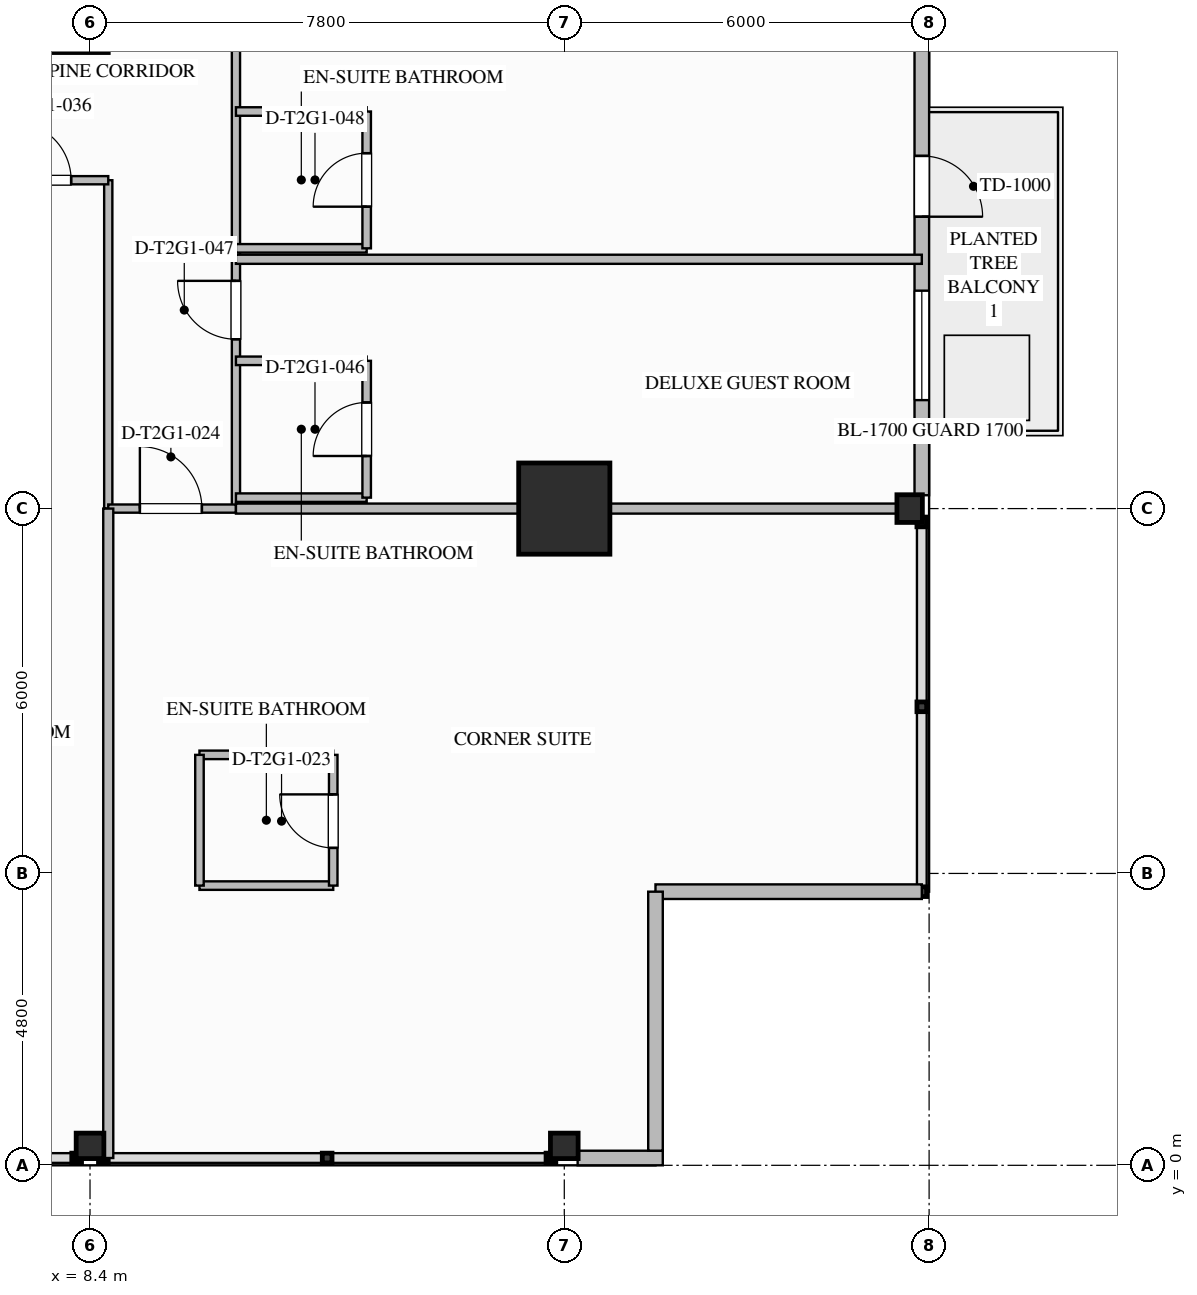
"""IFC4 building model, lengths in metres.
Left out: names, types, materials, properties, quantities, classifications, styles, units other than length and angle.
Written with IfcOpenShell. Run it as: python <this file> out.ifc"""

import sys

from ifc_helpers import new_model, si_unit, direction, frame, frame_2d, origin, origin_2d, place, context, subcontext, project, spatial, rectangle, i_section, extrude, element, fill, save


model = new_model("IFC4")
c1 = context("Model", 3, precision=1e-05, world=origin(), true_north=direction((0.0, 1.0)))
c2 = subcontext(c1, "Body", "Model", "MODEL_VIEW")
j1 = project(units=[si_unit("LENGTHUNIT", "METRE"), si_unit("PLANEANGLEUNIT", "RADIAN")], contexts=[c1])
p1 = place(None, origin())
s1 = spatial("IfcSite", under=j1, at=p1, CompositionType="ELEMENT")
p2 = place(p1, origin())
s2 = spatial("IfcBuilding", under=s1, at=p2, CompositionType="ELEMENT")
p3 = place(p2, frame((0.0, 0.0, 91.8)))
s3 = spatial("IfcBuildingStorey", under=s2, at=p3, CompositionType="ELEMENT", Elevation=91.8)
p4 = place(p3, frame((16.2, 10.8, 0.0), z_axis=(0.0, 0.0, 1.0), x_axis=(1.0, 0.0, 0.0)))
e1 = element("IfcColumn", 1, at=p4, inside=s3, PredefinedType="COLUMN", context=c2, shape_type="SweptSolid", body=[
    extrude(rectangle(XDim=1.5, YDim=1.5, at=origin_2d()), origin(), (0.0, 0.0, 1.0), 3.5),
])
for number, where, z_axis, x_axis in (
    (2, (21.88, 10.8, 0.0), (0.0, 0.0, 1.0), (1.0, 0.0, 0.0)),
    (3, (8.4, 0.32, 0.0), (0.0, 0.0, 1.0), (0.0, 1.0, 0.0)),
    (4, (16.2, 0.32, 0.0), (0.0, 0.0, 1.0), (0.0, 1.0, 0.0)),
):
    element("IfcColumn", number, at=place(p3, frame(where, z_axis=z_axis, x_axis=x_axis)), inside=s3, PredefinedType="COLUMN", context=c2, shape_type="SweptSolid", body=[
        extrude(i_section(OverallWidth=0.418, OverallDepth=0.455, WebThickness=0.042, FlangeThickness=0.068, FilletRadius=0.03, at=origin_2d()), origin(), (0.0, 0.0, 1.0), 3.497),
    ])
p5 = place(p3, frame((22.08, 18.38, 0.0), z_axis=(0.0, 0.0, 1.0), x_axis=(0.0, -1.0, 0.0)))
e5 = element("IfcWall", 5, at=p5, inside=s3, PredefinedType="STANDARD", context=c2, shape_type="SweptSolid", body=[
    extrude(rectangle(XDim=7.361, YDim=0.24, at=frame_2d((3.68, 0.0))), origin(), (0.0, 0.0, 1.0), 2.629),
])
p6 = place(p5, frame((1.781, 0.0, 0.0)))
e6 = element("IfcOpeningElement", 6, at=p6, cuts=e5, PredefinedType="OPENING", context=c2, shape_type="SweptSolid", body=[
    extrude(rectangle(XDim=1.0, YDim=2.2, at=frame_2d((0.5, 1.1))), frame((0.0, 0.13, 0.0), z_axis=(0.0, -1.0, 0.0), x_axis=(1.0, 0.0, 0.0)), (0.0, 0.0, 1.0), 0.26),
])
p7 = place(p5, frame((3.997, 0.0, 0.75)))
e7 = element("IfcOpeningElement", 7, at=p7, cuts=e5, PredefinedType="OPENING", context=c2, shape_type="SweptSolid", body=[
    extrude(rectangle(XDim=1.8, YDim=1.779, at=frame_2d((0.9, 0.89))), frame((0.0, 0.13, 0.0), z_axis=(0.0, -1.0, 0.0), x_axis=(1.0, 0.0, 0.0)), (0.0, 0.0, 1.0), 0.26),
])
p8 = place(p3, frame((17.82, 0.12, 0.0), z_axis=(0.0, 0.0, 1.0), x_axis=(-1.0, 0.0, 0.0)))
e8 = element("IfcWall", 8, at=p8, inside=s3, PredefinedType="STANDARD", context=c2, shape_type="SweptSolid", body=[
    extrude(rectangle(XDim=1.4, YDim=0.24, at=frame_2d((0.7, 0.0))), origin(), (0.0, 0.0, 1.0), 3.24),
])
p9 = place(p3, frame((22.08, 4.5, 0.0), z_axis=(0.0, 0.0, 1.0), x_axis=(-1.0, 0.0, 0.0)))
e9 = element("IfcWall", 9, at=p9, inside=s3, PredefinedType="STANDARD", context=c2, shape_type="SweptSolid", body=[
    extrude(rectangle(XDim=4.38, YDim=0.24, at=frame_2d((2.19, 0.0))), origin(), (0.0, 0.0, 1.0), 3.24),
])
p10 = place(p3, frame((17.7, 4.5, 0.0), z_axis=(0.0, 0.0, 1.0), x_axis=(0.0, -1.0, 0.0)))
e10 = element("IfcWall", 10, at=p10, inside=s3, PredefinedType="STANDARD", context=c2, shape_type="SweptSolid", body=[
    extrude(rectangle(XDim=4.26, YDim=0.24, at=frame_2d((2.13, 0.0))), origin(), (0.0, 0.0, 1.0), 3.24),
])
p11 = place(p3, frame((8.7, 10.8, 0.0), z_axis=(0.0, 0.0, 1.0), x_axis=(0.0, 1.0, 0.0)))
e11 = element("IfcWall", 11, at=p11, inside=s3, PredefinedType="PARTITIONING", context=c2, shape_type="SweptSolid", body=[
    extrude(rectangle(XDim=5.4, YDim=0.135, at=frame_2d((2.7, 0.0))), origin(), (0.0, 0.0, 1.0), 3.24),
])
p12 = place(p3, frame((-16.2, 16.2, 0.0), z_axis=(0.0, 0.0, 1.0), x_axis=(1.0, 0.0, 0.0)))
e12 = element("IfcWall", 12, at=p12, inside=s3, PredefinedType="PARTITIONING", context=c2, shape_type="SweptSolid", body=[
    extrude(rectangle(XDim=24.9, YDim=0.135, at=frame_2d((12.45, 0.0))), origin(), (0.0, 0.0, 1.0), 3.24),
])
p13 = place(p12, frame((3.271, 0.0, 0.0)))
e13 = element("IfcOpeningElement", 13, at=p13, cuts=e12, PredefinedType="OPENING", context=c2, shape_type="SweptSolid", body=[
    extrude(rectangle(XDim=0.96, YDim=2.15, at=frame_2d((0.48, 1.075))), frame((0.0, 0.077, 0.0), z_axis=(0.0, -1.0, 0.0), x_axis=(1.0, 0.0, 0.0)), (0.0, 0.0, 1.0), 0.155),
])
p14 = place(p12, frame((8.113, 0.0, 0.0)))
e14 = element("IfcOpeningElement", 14, at=p14, cuts=e12, PredefinedType="OPENING", context=c2, shape_type="SweptSolid", body=[
    extrude(rectangle(XDim=0.96, YDim=2.15, at=frame_2d((0.48, 1.075))), frame((0.0, 0.077, 0.0), z_axis=(0.0, -1.0, 0.0), x_axis=(1.0, 0.0, 0.0)), (0.0, 0.0, 1.0), 0.155),
])
p15 = place(p12, frame((13.035, 0.0, 0.0)))
e15 = element("IfcOpeningElement", 15, at=p15, cuts=e12, PredefinedType="OPENING", context=c2, shape_type="SweptSolid", body=[
    extrude(rectangle(XDim=1.26, YDim=2.2, at=frame_2d((0.63, 1.1))), frame((0.0, 0.077, 0.0), z_axis=(0.0, -1.0, 0.0), x_axis=(1.0, 0.0, 0.0)), (0.0, 0.0, 1.0), 0.155),
])
p16 = place(p12, frame((18.488, 0.0, 0.0)))
e16 = element("IfcOpeningElement", 16, at=p16, cuts=e12, PredefinedType="OPENING", context=c2, shape_type="SweptSolid", body=[
    extrude(rectangle(XDim=0.96, YDim=2.15, at=frame_2d((0.48, 1.075))), frame((0.0, 0.077, 0.0), z_axis=(0.0, -1.0, 0.0), x_axis=(1.0, 0.0, 0.0)), (0.0, 0.0, 1.0), 0.155),
])
p17 = place(p12, frame((23.329, 0.0, 0.0)))
e17 = element("IfcOpeningElement", 17, at=p17, cuts=e12, PredefinedType="OPENING", context=c2, shape_type="SweptSolid", body=[
    extrude(rectangle(XDim=0.96, YDim=2.15, at=frame_2d((0.48, 1.075))), frame((0.0, 0.077, 0.0), z_axis=(0.0, -1.0, 0.0), x_axis=(1.0, 0.0, 0.0)), (0.0, 0.0, 1.0), 0.155),
])
p18 = place(p3, frame((10.8, 10.8, 0.0), z_axis=(0.0, 0.0, 1.0), x_axis=(0.0, 1.0, 0.0)))
e18 = element("IfcWall", 18, at=p18, inside=s3, PredefinedType="PARTITIONING", context=c2, shape_type="SweptSolid", body=[
    extrude(rectangle(XDim=32.4, YDim=0.135, at=frame_2d((16.2, 0.0))), origin(), (0.0, 0.0, 1.0), 3.24),
])
p19 = place(p18, frame((2.785, 0.0, 0.0)))
e19 = element("IfcOpeningElement", 19, at=p19, cuts=e18, PredefinedType="OPENING", context=c2, shape_type="SweptSolid", body=[
    extrude(rectangle(XDim=0.96, YDim=2.15, at=frame_2d((0.48, 1.075))), frame((0.0, 0.077, 0.0), z_axis=(0.0, -1.0, 0.0), x_axis=(1.0, 0.0, 0.0)), (0.0, 0.0, 1.0), 0.155),
])
p20 = place(p18, frame((7.939, 0.0, 0.0)))
e20 = element("IfcOpeningElement", 20, at=p20, cuts=e18, PredefinedType="OPENING", context=c2, shape_type="SweptSolid", body=[
    extrude(rectangle(XDim=0.96, YDim=2.15, at=frame_2d((0.48, 1.075))), frame((0.0, 0.077, 0.0), z_axis=(0.0, -1.0, 0.0), x_axis=(1.0, 0.0, 0.0)), (0.0, 0.0, 1.0), 0.155),
])
p21 = place(p18, frame((13.99, 0.0, 0.0)))
e21 = element("IfcOpeningElement", 21, at=p21, cuts=e18, PredefinedType="OPENING", context=c2, shape_type="SweptSolid", body=[
    extrude(rectangle(XDim=0.96, YDim=2.15, at=frame_2d((0.48, 1.075))), frame((0.0, 0.077, 0.0), z_axis=(0.0, -1.0, 0.0), x_axis=(1.0, 0.0, 0.0)), (0.0, 0.0, 1.0), 0.155),
])
p22 = place(p18, frame((18.635, 0.0, 0.0)))
e22 = element("IfcOpeningElement", 22, at=p22, cuts=e18, PredefinedType="OPENING", context=c2, shape_type="SweptSolid", body=[
    extrude(rectangle(XDim=1.02, YDim=2.15, at=frame_2d((0.51, 1.075))), frame((0.0, 0.077, 0.0), z_axis=(0.0, -1.0, 0.0), x_axis=(1.0, 0.0, 0.0)), (0.0, 0.0, 1.0), 0.155),
])
p23 = place(p18, frame((25.281, 0.0, 0.0)))
e23 = element("IfcOpeningElement", 23, at=p23, cuts=e18, PredefinedType="OPENING", context=c2, shape_type="SweptSolid", body=[
    extrude(rectangle(XDim=0.96, YDim=2.15, at=frame_2d((0.48, 1.075))), frame((0.0, 0.077, 0.0), z_axis=(0.0, -1.0, 0.0), x_axis=(1.0, 0.0, 0.0)), (0.0, 0.0, 1.0), 0.155),
])
p24 = place(p18, frame((30.435, 0.0, 0.0)))
e24 = element("IfcOpeningElement", 24, at=p24, cuts=e18, PredefinedType="OPENING", context=c2, shape_type="SweptSolid", body=[
    extrude(rectangle(XDim=0.96, YDim=2.15, at=frame_2d((0.48, 1.075))), frame((0.0, 0.077, 0.0), z_axis=(0.0, -1.0, 0.0), x_axis=(1.0, 0.0, 0.0)), (0.0, 0.0, 1.0), 0.155),
])
p25 = place(p3, frame((8.7, 10.8, 0.0), z_axis=(0.0, 0.0, 1.0), x_axis=(1.0, 0.0, 0.0)))
e25 = element("IfcWall", 25, at=p25, inside=s3, PredefinedType="PARTITIONING", context=c2, shape_type="SweptSolid", body=[
    extrude(rectangle(XDim=2.1, YDim=0.135, at=frame_2d((1.05, 0.0))), origin(), (0.0, 0.0, 1.0), 2.452),
])
p26 = place(p25, frame((0.52, 0.0, 0.0)))
e26 = element("IfcOpeningElement", 26, at=p26, cuts=e25, PredefinedType="OPENING", context=c2, shape_type="SweptSolid", body=[
    extrude(rectangle(XDim=1.02, YDim=2.15, at=frame_2d((0.51, 1.075))), frame((0.0, 0.077, 0.0), z_axis=(0.0, -1.0, 0.0), x_axis=(1.0, 0.0, 0.0)), (0.0, 0.0, 1.0), 0.155),
])
p27 = place(p3, frame((8.7, 0.12, 0.0), z_axis=(0.0, 0.0, 1.0), x_axis=(0.0, 1.0, 0.0)))
e27 = element("IfcWall", 27, at=p27, inside=s3, PredefinedType="PARTITIONING", context=c2, shape_type="SweptSolid", body=[
    extrude(rectangle(XDim=10.68, YDim=0.165, at=frame_2d((5.34, 0.0))), origin(), (0.0, 0.0, 1.0), 2.452),
])
p28 = place(p3, frame((10.8, 10.8, 0.0), z_axis=(0.0, 0.0, 1.0), x_axis=(1.0, 0.0, 0.0)))
e28 = element("IfcWall", 28, at=p28, inside=s3, PredefinedType="PARTITIONING", context=c2, shape_type="SweptSolid", body=[
    extrude(rectangle(XDim=11.28, YDim=0.165, at=frame_2d((5.64, 0.0))), origin(), (0.0, 0.0, 1.0), 2.452),
])
for number, where, z_axis, x_axis in (
    (29, (10.2, 4.6, 0.0), (0.0, 0.0, 1.0), (1.0, 0.0, 0.0)),
    (30, (10.2, 6.75, 0.0), (0.0, 0.0, 1.0), (1.0, 0.0, 0.0)),
):
    element("IfcWall", number, at=place(p3, frame(where, z_axis=z_axis, x_axis=x_axis)), inside=s3, PredefinedType="PLUMBINGWALL", context=c2, shape_type="SweptSolid", body=[
        extrude(rectangle(XDim=2.2, YDim=0.14, at=frame_2d((1.1, 0.0))), origin(), (0.0, 0.0, 1.0), 3.24),
    ])
p29 = place(p3, frame((10.2, 4.6, 0.0), z_axis=(0.0, 0.0, 1.0), x_axis=(0.0, 1.0, 0.0)))
e31 = element("IfcWall", 31, at=p29, inside=s3, PredefinedType="PLUMBINGWALL", context=c2, shape_type="SweptSolid", body=[
    extrude(rectangle(XDim=2.15, YDim=0.14, at=frame_2d((1.075, 0.0))), origin(), (0.0, 0.0, 1.0), 3.24),
])
p30 = place(p3, frame((12.4, 4.6, 0.0), z_axis=(0.0, 0.0, 1.0), x_axis=(0.0, 1.0, 0.0)))
e32 = element("IfcWall", 32, at=p30, inside=s3, PredefinedType="PLUMBINGWALL", context=c2, shape_type="SweptSolid", body=[
    extrude(rectangle(XDim=2.15, YDim=0.14, at=frame_2d((1.075, 0.0))), origin(), (0.0, 0.0, 1.0), 3.24),
])
p31 = place(p30, frame((0.62, 0.0, 0.0)))
e33 = element("IfcOpeningElement", 33, at=p31, cuts=e32, PredefinedType="OPENING", context=c2, shape_type="SweptSolid", body=[
    extrude(rectangle(XDim=0.88, YDim=2.1, at=frame_2d((0.44, 1.05))), frame((0.0, 0.08, 0.0), z_axis=(0.0, -1.0, 0.0), x_axis=(1.0, 0.0, 0.0)), (0.0, 0.0, 1.0), 0.16),
])
p32 = place(p3, frame((10.8, 10.98, 0.0), z_axis=(0.0, 0.0, 1.0), x_axis=(1.0, 0.0, 0.0)))
e34 = element("IfcWall", 34, at=p32, inside=s3, PredefinedType="PLUMBINGWALL", context=c2, shape_type="SweptSolid", body=[
    extrude(rectangle(XDim=2.15, YDim=0.14, at=frame_2d((1.075, 0.0))), origin(), (0.0, 0.0, 1.0), 2.452),
])
p33 = place(p3, frame((10.8, 13.23, 0.0), z_axis=(0.0, 0.0, 1.0), x_axis=(1.0, 0.0, 0.0)))
e35 = element("IfcWall", 35, at=p33, inside=s3, PredefinedType="PLUMBINGWALL", context=c2, shape_type="SweptSolid", body=[
    extrude(rectangle(XDim=2.15, YDim=0.14, at=frame_2d((1.075, 0.0))), origin(), (0.0, 0.0, 1.0), 3.24),
])
p34 = place(p3, frame((12.95, 10.98, 0.0), z_axis=(0.0, 0.0, 1.0), x_axis=(0.0, 1.0, 0.0)))
e36 = element("IfcWall", 36, at=p34, inside=s3, PredefinedType="PLUMBINGWALL", context=c2, shape_type="SweptSolid", body=[
    extrude(rectangle(XDim=2.25, YDim=0.14, at=frame_2d((1.125, 0.0))), origin(), (0.0, 0.0, 1.0), 3.24),
])
p35 = place(p34, frame((0.685, 0.0, 0.0)))
e37 = element("IfcOpeningElement", 37, at=p35, cuts=e36, PredefinedType="OPENING", context=c2, shape_type="SweptSolid", body=[
    extrude(rectangle(XDim=0.88, YDim=2.1, at=frame_2d((0.44, 1.05))), frame((0.0, 0.08, 0.0), z_axis=(0.0, -1.0, 0.0), x_axis=(1.0, 0.0, 0.0)), (0.0, 0.0, 1.0), 0.16),
])
p36 = place(p3, frame((10.8, 14.9, 0.0), z_axis=(0.0, 0.0, 1.0), x_axis=(1.0, 0.0, 0.0)))
e38 = element("IfcWall", 38, at=p36, inside=s3, PredefinedType="PARTITIONING", context=c2, shape_type="SweptSolid", body=[
    extrude(rectangle(XDim=11.28, YDim=0.15, at=frame_2d((5.64, 0.0))), origin(), (0.0, 0.0, 1.0), 2.765),
])
for number, where, z_axis, x_axis in (
    (39, (10.8, 15.08, 0.0), (0.0, 0.0, 1.0), (1.0, 0.0, 0.0)),
    (40, (10.8, 17.33, 0.0), (0.0, 0.0, 1.0), (1.0, 0.0, 0.0)),
):
    element("IfcWall", number, at=place(p3, frame(where, z_axis=z_axis, x_axis=x_axis)), inside=s3, PredefinedType="PLUMBINGWALL", context=c2, shape_type="SweptSolid", body=[
        extrude(rectangle(XDim=2.15, YDim=0.14, at=frame_2d((1.075, 0.0))), origin(), (0.0, 0.0, 1.0), 3.24),
    ])
p37 = place(p3, frame((12.95, 15.08, 0.0), z_axis=(0.0, 0.0, 1.0), x_axis=(0.0, 1.0, 0.0)))
e41 = element("IfcWall", 41, at=p37, inside=s3, PredefinedType="PLUMBINGWALL", context=c2, shape_type="SweptSolid", body=[
    extrude(rectangle(XDim=2.25, YDim=0.14, at=frame_2d((1.125, 0.0))), origin(), (0.0, 0.0, 1.0), 3.24),
])
p38 = place(p37, frame((0.685, 0.0, 0.0)))
e42 = element("IfcOpeningElement", 42, at=p38, cuts=e41, PredefinedType="OPENING", context=c2, shape_type="SweptSolid", body=[
    extrude(rectangle(XDim=0.88, YDim=2.1, at=frame_2d((0.44, 1.05))), frame((0.0, 0.08, 0.0), z_axis=(0.0, -1.0, 0.0), x_axis=(1.0, 0.0, 0.0)), (0.0, 0.0, 1.0), 0.16),
])
p39 = place(p6, origin())
e43 = element("IfcDoor", 43, at=p39, inside=s3, OperationType="SINGLE_SWING_RIGHT", PredefinedType="DOOR", context=c2, shape_type="SweptSolid", body=[
    extrude(rectangle(XDim=1.0, YDim=2.2, at=frame_2d((0.5, 1.1))), frame((0.0, 0.025, 0.0), z_axis=(0.0, -1.0, 0.0), x_axis=(1.0, 0.0, 0.0)), (0.0, 0.0, 1.0), 0.05),
])
fill(e6, e43)
p40 = place(p7, origin())
e44 = element("IfcWindow", 44, at=p40, inside=s3, PartitioningType="SINGLE_PANEL", PredefinedType="WINDOW", context=c2, shape_type="SweptSolid", body=[
    extrude(rectangle(XDim=1.8, YDim=1.779, at=frame_2d((0.9, 0.89))), frame((0.0, 0.03, 0.0), z_axis=(0.0, -1.0, 0.0), x_axis=(1.0, 0.0, 0.0)), (0.0, 0.0, 1.0), 0.06),
])
fill(e7, e44)
p41 = place(p31, origin())
e45 = element("IfcDoor", 45, at=p41, inside=s3, OperationType="SINGLE_SWING_RIGHT", PredefinedType="DOOR", context=c2, shape_type="SweptSolid", body=[
    extrude(rectangle(XDim=0.88, YDim=2.1, at=frame_2d((0.44, 1.05))), frame((0.0, 0.025, 0.0), z_axis=(0.0, -1.0, 0.0), x_axis=(1.0, 0.0, 0.0)), (0.0, 0.0, 1.0), 0.05),
])
fill(e33, e45)
p42 = place(p26, origin())
e46 = element("IfcDoor", 46, at=p42, inside=s3, OperationType="SINGLE_SWING_LEFT", PredefinedType="DOOR", context=c2, shape_type="SweptSolid", body=[
    extrude(rectangle(XDim=1.02, YDim=2.15, at=frame_2d((0.51, 1.075))), frame((0.0, 0.025, 0.0), z_axis=(0.0, -1.0, 0.0), x_axis=(1.0, 0.0, 0.0)), (0.0, 0.0, 1.0), 0.05),
])
fill(e26, e46)
p43 = place(p17, origin())
e47 = element("IfcDoor", 47, at=p43, inside=s3, OperationType="SINGLE_SWING_LEFT", PredefinedType="DOOR", context=c2, shape_type="SweptSolid", body=[
    extrude(rectangle(XDim=0.96, YDim=2.15, at=frame_2d((0.48, 1.075))), frame((0.0, 0.025, 0.0), z_axis=(0.0, -1.0, 0.0), x_axis=(1.0, 0.0, 0.0)), (0.0, 0.0, 1.0), 0.05),
])
fill(e17, e47)
p44 = place(p35, origin())
e48 = element("IfcDoor", 48, at=p44, inside=s3, OperationType="SINGLE_SWING_LEFT", PredefinedType="DOOR", context=c2, shape_type="SweptSolid", body=[
    extrude(rectangle(XDim=0.88, YDim=2.1, at=frame_2d((0.44, 1.05))), frame((0.0, 0.025, 0.0), z_axis=(0.0, -1.0, 0.0), x_axis=(1.0, 0.0, 0.0)), (0.0, 0.0, 1.0), 0.05),
])
fill(e37, e48)
p45 = place(p19, origin())
e49 = element("IfcDoor", 49, at=p45, inside=s3, OperationType="SINGLE_SWING_RIGHT", PredefinedType="DOOR", context=c2, shape_type="SweptSolid", body=[
    extrude(rectangle(XDim=0.96, YDim=2.15, at=frame_2d((0.48, 1.075))), frame((0.0, 0.025, 0.0), z_axis=(0.0, -1.0, 0.0), x_axis=(1.0, 0.0, 0.0)), (0.0, 0.0, 1.0), 0.05),
])
fill(e19, e49)
p46 = place(p38, origin())
e50 = element("IfcDoor", 50, at=p46, inside=s3, OperationType="SINGLE_SWING_LEFT", PredefinedType="DOOR", context=c2, shape_type="SweptSolid", body=[
    extrude(rectangle(XDim=0.88, YDim=2.1, at=frame_2d((0.44, 1.05))), frame((0.0, 0.025, 0.0), z_axis=(0.0, -1.0, 0.0), x_axis=(1.0, 0.0, 0.0)), (0.0, 0.0, 1.0), 0.05),
])
fill(e42, e50)
save(model, sys.argv[1])
